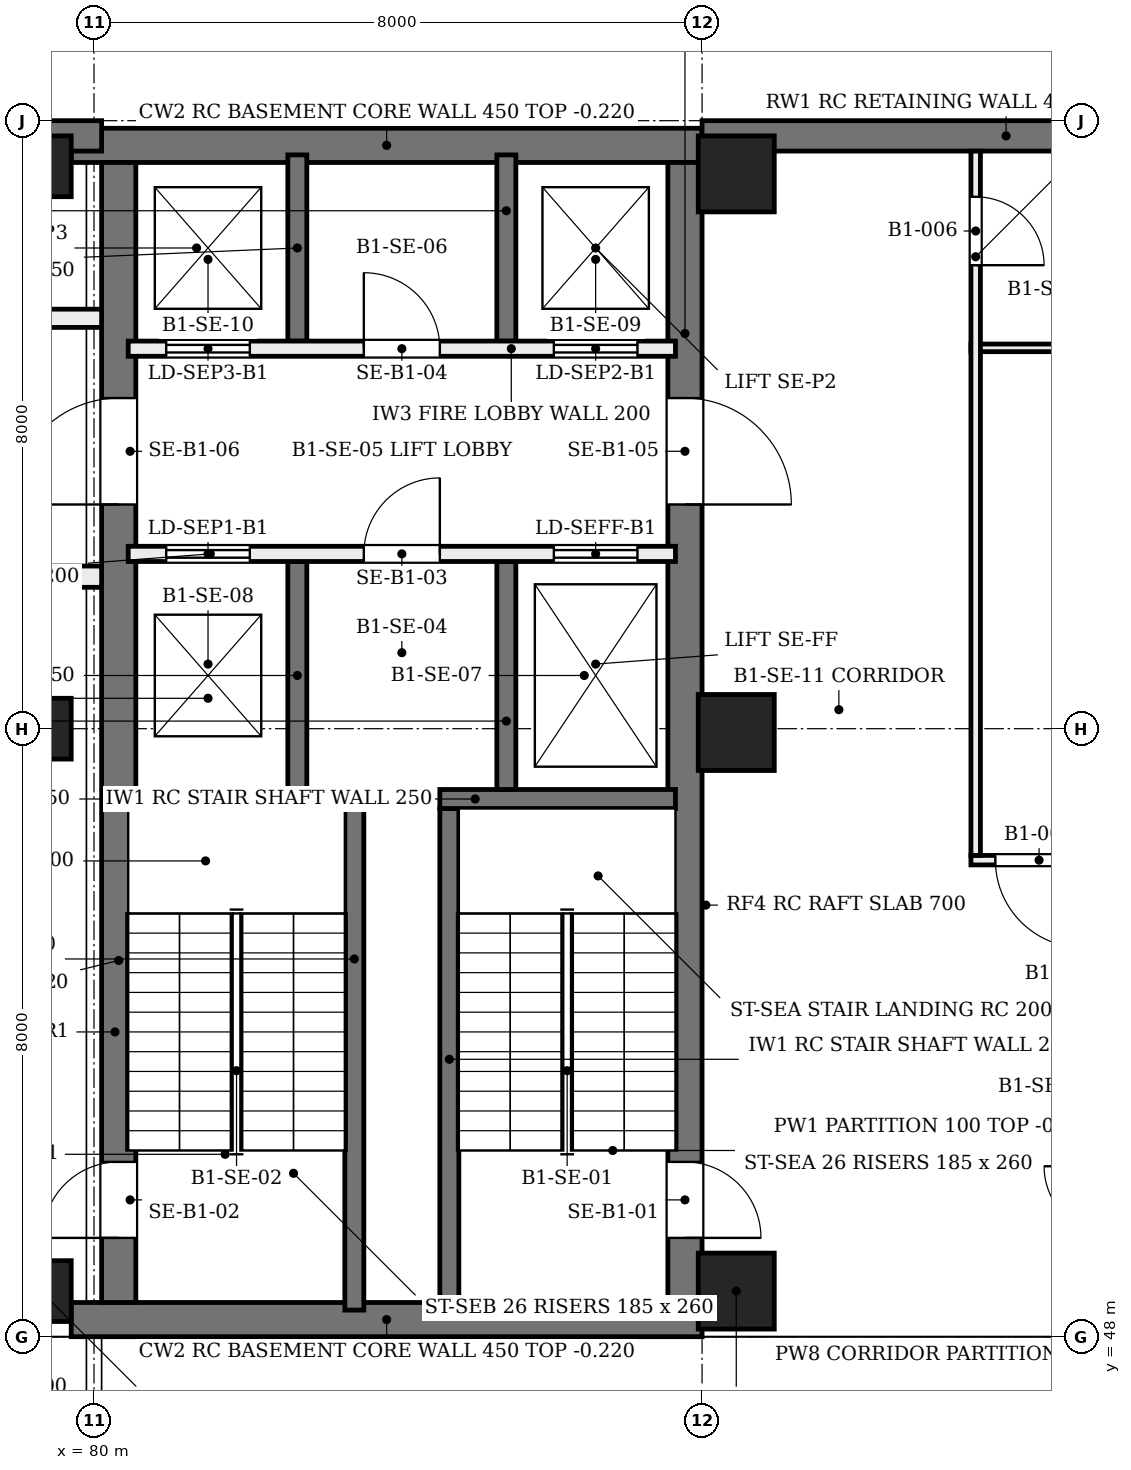
"""IFC4 building model, lengths in metres.
Left out: names, types, materials, properties, quantities, classifications, styles, units other than length and angle.
Written with IfcOpenShell. Run it as: python <this file> out.ifc"""

import sys

from ifc_helpers import new_model, si_unit, direction, frame, frame_2d, origin, origin_2d, place, context, subcontext, project, spatial, rectangle, extrude, element, fill, save


model = new_model("IFC4")
c1 = context("Model", 3, precision=1e-05, world=origin(), true_north=direction((0.0, 1.0)))
c2 = subcontext(c1, "Body", "Model", "MODEL_VIEW")
j1 = project(units=[si_unit("LENGTHUNIT", "METRE"), si_unit("PLANEANGLEUNIT", "RADIAN")], contexts=[c1])
p1 = place(None, origin())
s1 = spatial("IfcSite", under=j1, at=p1, CompositionType="ELEMENT")
p2 = place(p1, origin())
s2 = spatial("IfcBuilding", under=s1, at=p2, CompositionType="ELEMENT")
p3 = place(p2, frame((0.0, 0.0, -4.8)))
s3 = spatial("IfcBuildingStorey", under=s2, at=p3, CompositionType="ELEMENT", Elevation=-4.8)
for number, where, z_axis, x_axis in (
    (1, (79.7, 48.225, 0.0), (0.0, 0.0, 1.0), (1.0, 0.0, 0.0)),
    (2, (79.7, 63.675, 0.0), (0.0, 0.0, 1.0), (1.0, 0.0, 0.0)),
):
    element("IfcWall", number, at=place(p3, frame(where, z_axis=z_axis, x_axis=x_axis)), inside=s3, PredefinedType="SHEAR", context=c2, shape_type="SweptSolid", body=[
        extrude(rectangle(XDim=8.3, YDim=0.45, at=frame_2d((4.15, 0.0))), origin(), (0.0, 0.0, 1.0), 4.58),
    ])
p4 = place(p3, frame((80.325, 48.45, 0.0), z_axis=(0.0, 0.0, 1.0), x_axis=(0.0, 1.0, 0.0)))
e3 = element("IfcWall", 3, at=p4, inside=s3, PredefinedType="SHEAR", context=c2, shape_type="SweptSolid", body=[
    extrude(rectangle(XDim=15.0, YDim=0.45, at=frame_2d((7.5, 0.0))), origin(), (0.0, 0.0, 1.0), 4.58),
])
p5 = place(p4, frame((0.85, 0.0, 0.0)))
e4 = element("IfcOpeningElement", 4, at=p5, cuts=e3, PredefinedType="OPENING", context=c2, shape_type="SweptSolid", body=[
    extrude(rectangle(XDim=1.0, YDim=2.1, at=frame_2d((0.5, 1.05))), frame((0.0, 0.235, 0.0), z_axis=(0.0, -1.0, 0.0), x_axis=(1.0, 0.0, 0.0)), (0.0, 0.0, 1.0), 0.47),
])
p6 = place(p4, frame((10.5, 0.0, 0.0)))
e5 = element("IfcOpeningElement", 5, at=p6, cuts=e3, PredefinedType="OPENING", context=c2, shape_type="SweptSolid", body=[
    extrude(rectangle(XDim=1.4, YDim=2.1, at=frame_2d((0.7, 1.05))), frame((0.0, 0.235, 0.0), z_axis=(0.0, -1.0, 0.0), x_axis=(1.0, 0.0, 0.0)), (0.0, 0.0, 1.0), 0.47),
])
p7 = place(p3, frame((87.775, 48.45, 0.0), z_axis=(0.0, 0.0, 1.0), x_axis=(0.0, 1.0, 0.0)))
e6 = element("IfcWall", 6, at=p7, inside=s3, PredefinedType="SHEAR", context=c2, shape_type="SweptSolid", body=[
    extrude(rectangle(XDim=15.0, YDim=0.45, at=frame_2d((7.5, 0.0))), origin(), (0.0, 0.0, 1.0), 4.58),
])
p8 = place(p7, frame((0.85, 0.0, 0.0)))
e7 = element("IfcOpeningElement", 7, at=p8, cuts=e6, PredefinedType="OPENING", context=c2, shape_type="SweptSolid", body=[
    extrude(rectangle(XDim=1.0, YDim=2.1, at=frame_2d((0.5, 1.05))), frame((0.0, 0.235, 0.0), z_axis=(0.0, -1.0, 0.0), x_axis=(1.0, 0.0, 0.0)), (0.0, 0.0, 1.0), 0.47),
])
p9 = place(p7, frame((10.5, 0.0, 0.0)))
e8 = element("IfcOpeningElement", 8, at=p9, cuts=e6, PredefinedType="OPENING", context=c2, shape_type="SweptSolid", body=[
    extrude(rectangle(XDim=1.4, YDim=2.1, at=frame_2d((0.7, 1.05))), frame((0.0, 0.235, 0.0), z_axis=(0.0, -1.0, 0.0), x_axis=(1.0, 0.0, 0.0)), (0.0, 0.0, 1.0), 0.47),
])
for number, where, z_axis, x_axis in (
    (9, (88.45, 48.6, 0.0), (0.0, 0.0, 1.0), (1.0, 0.0, 0.0)),
    (10, (88.45, 55.95, 0.0), (0.0, 0.0, 1.0), (1.0, 0.0, 0.0)),
    (11, (88.45, 63.3, 0.0), (0.0, 0.0, 1.0), (1.0, 0.0, 0.0)),
):
    element("IfcColumn", number, at=place(p3, frame(where, z_axis=z_axis, x_axis=x_axis)), inside=s3, PredefinedType="COLUMN", context=c2, shape_type="SweptSolid", body=[
        extrude(rectangle(XDim=1.0, YDim=1.0, at=origin_2d()), origin(), (0.0, 0.0, 1.0), 4.8),
    ])
for number, where, z_axis, x_axis in (
    (12, (79.3, 48.6, 0.0), (0.0, 0.0, 1.0), (1.0, 0.0, 0.0)),
    (13, (79.3, 56.0, 0.0), (0.0, 0.0, 1.0), (1.0, 0.0, 0.0)),
    (14, (79.3, 63.4, 0.0), (0.0, 0.0, 1.0), (1.0, 0.0, 0.0)),
):
    element("IfcColumn", number, at=place(p3, frame(where, z_axis=z_axis, x_axis=x_axis)), inside=s3, PredefinedType="COLUMN", context=c2, shape_type="SweptSolid", body=[
        extrude(rectangle(XDim=0.8, YDim=0.8, at=origin_2d()), origin(), (0.0, 0.0, 1.0), 4.58),
    ])
p10 = place(p3, frame((23.9, 63.8, 0.0), z_axis=(0.0, 0.0, 1.0), x_axis=(1.0, 0.0, 0.0)))
e15 = element("IfcWall", 15, at=p10, inside=s3, PredefinedType="SOLIDWALL", context=c2, shape_type="SweptSolid", body=[
    extrude(rectangle(XDim=56.2, YDim=0.4, at=frame_2d((28.1, 0.0))), origin(), (0.0, 0.0, 1.0), 4.55),
])
p11 = place(p3, frame((88.0, 63.8, 0.0), z_axis=(0.0, 0.0, 1.0), x_axis=(1.0, 0.0, 0.0)))
e16 = element("IfcWall", 16, at=p11, inside=s3, PredefinedType="SOLIDWALL", context=c2, shape_type="SweptSolid", body=[
    extrude(rectangle(XDim=8.0, YDim=0.4, at=frame_2d((4.0, 0.0))), origin(), (0.0, 0.0, 1.0), 4.55),
])
for number, where, z_axis, x_axis in (
    (17, (84.675, 48.35, 0.0), (0.0, 0.0, 1.0), (0.0, 1.0, 0.0)),
    (18, (83.425, 48.35, 0.0), (0.0, 0.0, 1.0), (0.0, 1.0, 0.0)),
):
    element("IfcWall", number, at=place(p3, frame(where, z_axis=z_axis, x_axis=x_axis)), inside=s3, PredefinedType="SOLIDWALL", context=c2, shape_type="SweptSolid", body=[
        extrude(rectangle(XDim=6.6, YDim=0.25, at=frame_2d((3.3, 0.0))), origin(), (0.0, 0.0, 1.0), 4.55),
    ])
p12 = place(p3, frame((87.65, 55.075, 0.0), z_axis=(0.0, 0.0, 1.0), x_axis=(-1.0, 0.0, 0.0)))
e19 = element("IfcWall", 19, at=p12, inside=s3, PredefinedType="SOLIDWALL", context=c2, shape_type="SweptSolid", body=[
    extrude(rectangle(XDim=3.1, YDim=0.25, at=frame_2d((1.55, 0.0))), origin(), (0.0, 0.0, 1.0), 4.55),
])
p13 = place(p3, frame((83.55, 55.075, 0.0), z_axis=(0.0, 0.0, 1.0), x_axis=(-1.0, 0.0, 0.0)))
e20 = element("IfcWall", 20, at=p13, inside=s3, PredefinedType="SOLIDWALL", context=c2, shape_type="SweptSolid", body=[
    extrude(rectangle(XDim=3.1, YDim=0.25, at=frame_2d((1.55, 0.0))), origin(), (0.0, 0.0, 1.0), 4.55),
])
p14 = place(p3, frame((85.425, 55.2, 0.0), z_axis=(0.0, 0.0, 1.0), x_axis=(0.0, 1.0, 0.0)))
e21 = element("IfcWall", 21, at=p14, inside=s3, PredefinedType="SOLIDWALL", context=c2, shape_type="SweptSolid", body=[
    extrude(rectangle(XDim=3.0, YDim=0.25, at=frame_2d((1.5, 0.0))), origin(), (0.0, 0.0, 1.0), 4.55),
])
p15 = place(p3, frame((85.425, 61.1, 0.0), z_axis=(0.0, 0.0, 1.0), x_axis=(0.0, 1.0, 0.0)))
e22 = element("IfcWall", 22, at=p15, inside=s3, PredefinedType="SOLIDWALL", context=c2, shape_type="SweptSolid", body=[
    extrude(rectangle(XDim=2.45, YDim=0.25, at=frame_2d((1.225, 0.0))), origin(), (0.0, 0.0, 1.0), 4.55),
])
p16 = place(p3, frame((82.675, 55.2, 0.0), z_axis=(0.0, 0.0, 1.0), x_axis=(0.0, 1.0, 0.0)))
e23 = element("IfcWall", 23, at=p16, inside=s3, PredefinedType="SOLIDWALL", context=c2, shape_type="SweptSolid", body=[
    extrude(rectangle(XDim=3.0, YDim=0.25, at=frame_2d((1.5, 0.0))), origin(), (0.0, 0.0, 1.0), 4.55),
])
p17 = place(p3, frame((82.675, 61.1, 0.0), z_axis=(0.0, 0.0, 1.0), x_axis=(0.0, 1.0, 0.0)))
e24 = element("IfcWall", 24, at=p17, inside=s3, PredefinedType="SOLIDWALL", context=c2, shape_type="SweptSolid", body=[
    extrude(rectangle(XDim=2.45, YDim=0.25, at=frame_2d((1.225, 0.0))), origin(), (0.0, 0.0, 1.0), 4.55),
])
p18 = place(p3, frame((87.65, 58.3, 0.0), z_axis=(0.0, 0.0, 1.0), x_axis=(-1.0, 0.0, 0.0)))
e25 = element("IfcWall", 25, at=p18, inside=s3, PredefinedType="SOLIDWALL", context=c2, shape_type="SweptSolid", body=[
    extrude(rectangle(XDim=7.2, YDim=0.2, at=frame_2d((3.6, 0.0))), origin(), (0.0, 0.0, 1.0), 4.55),
])
p19 = place(p18, frame((0.5, 0.0, 0.0)))
e26 = element("IfcOpeningElement", 26, at=p19, cuts=e25, PredefinedType="OPENING", context=c2, shape_type="SweptSolid", body=[
    extrude(rectangle(XDim=1.1, YDim=2.1, at=frame_2d((0.55, 1.05))), frame((0.0, 0.11, 0.0), z_axis=(0.0, -1.0, 0.0), x_axis=(1.0, 0.0, 0.0)), (0.0, 0.0, 1.0), 0.22),
])
p20 = place(p18, frame((5.6, 0.0, 0.0)))
e27 = element("IfcOpeningElement", 27, at=p20, cuts=e25, PredefinedType="OPENING", context=c2, shape_type="SweptSolid", body=[
    extrude(rectangle(XDim=1.1, YDim=2.1, at=frame_2d((0.55, 1.05))), frame((0.0, 0.11, 0.0), z_axis=(0.0, -1.0, 0.0), x_axis=(1.0, 0.0, 0.0)), (0.0, 0.0, 1.0), 0.22),
])
p21 = place(p18, frame((3.1, 0.0, 0.0)))
e28 = element("IfcOpeningElement", 28, at=p21, cuts=e25, PredefinedType="OPENING", context=c2, shape_type="SweptSolid", body=[
    extrude(rectangle(XDim=1.0, YDim=2.1, at=frame_2d((0.5, 1.05))), frame((0.0, 0.11, 0.0), z_axis=(0.0, -1.0, 0.0), x_axis=(1.0, 0.0, 0.0)), (0.0, 0.0, 1.0), 0.22),
])
p22 = place(p3, frame((87.65, 61.0, 0.0), z_axis=(0.0, 0.0, 1.0), x_axis=(-1.0, 0.0, 0.0)))
e29 = element("IfcWall", 29, at=p22, inside=s3, PredefinedType="SOLIDWALL", context=c2, shape_type="SweptSolid", body=[
    extrude(rectangle(XDim=7.2, YDim=0.2, at=frame_2d((3.6, 0.0))), origin(), (0.0, 0.0, 1.0), 4.55),
])
p23 = place(p22, frame((0.5, 0.0, 0.0)))
e30 = element("IfcOpeningElement", 30, at=p23, cuts=e29, PredefinedType="OPENING", context=c2, shape_type="SweptSolid", body=[
    extrude(rectangle(XDim=1.1, YDim=2.1, at=frame_2d((0.55, 1.05))), frame((0.0, 0.11, 0.0), z_axis=(0.0, -1.0, 0.0), x_axis=(1.0, 0.0, 0.0)), (0.0, 0.0, 1.0), 0.22),
])
p24 = place(p22, frame((5.6, 0.0, 0.0)))
e31 = element("IfcOpeningElement", 31, at=p24, cuts=e29, PredefinedType="OPENING", context=c2, shape_type="SweptSolid", body=[
    extrude(rectangle(XDim=1.1, YDim=2.1, at=frame_2d((0.55, 1.05))), frame((0.0, 0.11, 0.0), z_axis=(0.0, -1.0, 0.0), x_axis=(1.0, 0.0, 0.0)), (0.0, 0.0, 1.0), 0.22),
])
p25 = place(p22, frame((3.1, 0.0, 0.0)))
e32 = element("IfcOpeningElement", 32, at=p25, cuts=e29, PredefinedType="OPENING", context=c2, shape_type="SweptSolid", body=[
    extrude(rectangle(XDim=1.0, YDim=2.1, at=frame_2d((0.5, 1.05))), frame((0.0, 0.11, 0.0), z_axis=(0.0, -1.0, 0.0), x_axis=(1.0, 0.0, 0.0)), (0.0, 0.0, 1.0), 0.22),
])
p26 = place(p3, frame((91.538, 54.27, 0.0), z_axis=(0.0, 0.0, 1.0), x_axis=(1.0, 0.0, 0.0)))
e33 = element("IfcWall", 33, at=p26, inside=s3, PredefinedType="PARTITIONING", context=c2, shape_type="SweptSolid", body=[
    extrude(rectangle(XDim=1.925, YDim=0.125, at=frame_2d((0.962, 0.0))), origin(), (0.0, 0.0, 1.0), 4.56),
])
p27 = place(p26, frame((0.322, 0.0, 0.0)))
e34 = element("IfcOpeningElement", 34, at=p27, cuts=e33, PredefinedType="OPENING", context=c2, shape_type="SweptSolid", body=[
    extrude(rectangle(XDim=1.15, YDim=2.1, at=frame_2d((0.575, 1.05))), frame((0.0, 0.073, 0.0), z_axis=(0.0, -1.0, 0.0), x_axis=(1.0, 0.0, 0.0)), (0.0, 0.0, 1.0), 0.145),
])
p28 = place(p3, frame((91.538, 61.011, 0.0), z_axis=(0.0, 0.0, 1.0), x_axis=(1.0, 0.0, 0.0)))
e35 = element("IfcWall", 35, at=p28, inside=s3, PredefinedType="PARTITIONING", context=c2, shape_type="SweptSolid", body=[
    extrude(rectangle(XDim=4.057, YDim=0.1, at=frame_2d((2.029, 0.0))), origin(), (0.0, 0.0, 1.0), 3.98),
])
p29 = place(p3, frame((91.6, 54.333, 0.0), z_axis=(0.0, 0.0, 1.0), x_axis=(0.0, 1.0, 0.0)))
e36 = element("IfcWall", 36, at=p29, inside=s3, PredefinedType="PARTITIONING", context=c2, shape_type="SweptSolid", body=[
    extrude(rectangle(XDim=9.267, YDim=0.125, at=frame_2d((4.634, 0.0))), origin(), (0.0, 0.0, 1.0), 3.98),
])
p30 = place(p29, frame((7.766, 0.0, 0.0)))
e37 = element("IfcOpeningElement", 37, at=p30, cuts=e36, PredefinedType="OPENING", context=c2, shape_type="SweptSolid", body=[
    extrude(rectangle(XDim=0.9, YDim=2.1, at=frame_2d((0.45, 1.05))), frame((0.0, 0.073, 0.0), z_axis=(0.0, -1.0, 0.0), x_axis=(1.0, 0.0, 0.0)), (0.0, 0.0, 1.0), 0.145),
])
p31 = place(p3, frame((64.355, 58.0, 0.0), z_axis=(0.0, 0.0, 1.0), x_axis=(1.0, 0.0, 0.0)))
e38 = element("IfcWall", 38, at=p31, inside=s3, PredefinedType="PARTITIONING", context=c2, shape_type="SweptSolid", body=[
    extrude(rectangle(XDim=15.745, YDim=0.28, at=frame_2d((7.873, 0.0))), origin(), (0.0, 0.0, 1.0), 3.88),
])
p32 = place(p31, frame((6.945, 0.0, 0.0)))
e39 = element("IfcOpeningElement", 39, at=p32, cuts=e38, PredefinedType="OPENING", context=c2, shape_type="SweptSolid", body=[
    extrude(rectangle(XDim=1.3, YDim=2.4, at=frame_2d((0.65, 1.2))), frame((0.0, 0.15, 0.0), z_axis=(0.0, -1.0, 0.0), x_axis=(1.0, 0.0, 0.0)), (0.0, 0.0, 1.0), 0.3),
])
p33 = place(p3, frame((64.355, 61.4, 0.0), z_axis=(0.0, 0.0, 1.0), x_axis=(1.0, 0.0, 0.0)))
e40 = element("IfcWall", 40, at=p33, inside=s3, PredefinedType="PARTITIONING", context=c2, shape_type="SweptSolid", body=[
    extrude(rectangle(XDim=15.745, YDim=0.24, at=frame_2d((7.873, 0.0))), origin(), (0.0, 0.0, 1.0), 3.88),
])
p34 = place(p33, frame((6.733, 0.0, 0.0)))
e41 = element("IfcOpeningElement", 41, at=p34, cuts=e40, PredefinedType="OPENING", context=c2, shape_type="SweptSolid", body=[
    extrude(rectangle(XDim=1.4, YDim=2.4, at=frame_2d((0.7, 1.2))), frame((0.0, 0.13, 0.0), z_axis=(0.0, -1.0, 0.0), x_axis=(1.0, 0.0, 0.0)), (0.0, 0.0, 1.0), 0.26),
])
p35 = place(p8, frame((1.0, 0.0, 0.0), z_axis=(0.0, 0.0, 1.0), x_axis=(-1.0, 0.0, 0.0)))
e42 = element("IfcDoor", 42, at=p35, inside=s3, OperationType="SINGLE_SWING_LEFT", PredefinedType="DOOR", context=c2, shape_type="SweptSolid", body=[
    extrude(rectangle(XDim=1.0, YDim=2.1, at=frame_2d((0.5, 1.05))), frame((0.0, 0.025, 0.0), z_axis=(0.0, -1.0, 0.0), x_axis=(1.0, 0.0, 0.0)), (0.0, 0.0, 1.0), 0.05),
])
fill(e7, e42)
p36 = place(p5, origin())
e43 = element("IfcDoor", 43, at=p36, inside=s3, OperationType="SINGLE_SWING_LEFT", PredefinedType="DOOR", context=c2, shape_type="SweptSolid", body=[
    extrude(rectangle(XDim=1.0, YDim=2.1, at=frame_2d((0.5, 1.05))), frame((0.0, 0.025, 0.0), z_axis=(0.0, -1.0, 0.0), x_axis=(1.0, 0.0, 0.0)), (0.0, 0.0, 1.0), 0.05),
])
fill(e4, e43)
p37 = place(p19, frame((1.1, 0.0, 0.0), z_axis=(0.0, 0.0, 1.0), x_axis=(-1.0, 0.0, 0.0)))
e44 = element("IfcDoor", 44, at=p37, inside=s3, OperationType="DOUBLE_DOOR_SLIDING", PredefinedType="DOOR", context=c2, shape_type="SweptSolid", body=[
    extrude(rectangle(XDim=1.1, YDim=2.1, at=frame_2d((0.55, 1.05))), frame((0.0, 0.025, 0.0), z_axis=(0.0, -1.0, 0.0), x_axis=(1.0, 0.0, 0.0)), (0.0, 0.0, 1.0), 0.05),
])
fill(e26, e44)
p38 = place(p20, frame((1.1, 0.0, 0.0), z_axis=(0.0, 0.0, 1.0), x_axis=(-1.0, 0.0, 0.0)))
e45 = element("IfcDoor", 45, at=p38, inside=s3, OperationType="DOUBLE_DOOR_SLIDING", PredefinedType="DOOR", context=c2, shape_type="SweptSolid", body=[
    extrude(rectangle(XDim=1.1, YDim=2.1, at=frame_2d((0.55, 1.05))), frame((0.0, 0.025, 0.0), z_axis=(0.0, -1.0, 0.0), x_axis=(1.0, 0.0, 0.0)), (0.0, 0.0, 1.0), 0.05),
])
fill(e27, e45)
p39 = place(p23, origin())
e46 = element("IfcDoor", 46, at=p39, inside=s3, OperationType="DOUBLE_DOOR_SLIDING", PredefinedType="DOOR", context=c2, shape_type="SweptSolid", body=[
    extrude(rectangle(XDim=1.1, YDim=2.1, at=frame_2d((0.55, 1.05))), frame((0.0, 0.025, 0.0), z_axis=(0.0, -1.0, 0.0), x_axis=(1.0, 0.0, 0.0)), (0.0, 0.0, 1.0), 0.05),
])
fill(e30, e46)
p40 = place(p24, origin())
e47 = element("IfcDoor", 47, at=p40, inside=s3, OperationType="DOUBLE_DOOR_SLIDING", PredefinedType="DOOR", context=c2, shape_type="SweptSolid", body=[
    extrude(rectangle(XDim=1.1, YDim=2.1, at=frame_2d((0.55, 1.05))), frame((0.0, 0.025, 0.0), z_axis=(0.0, -1.0, 0.0), x_axis=(1.0, 0.0, 0.0)), (0.0, 0.0, 1.0), 0.05),
])
fill(e31, e47)
p41 = place(p21, frame((1.0, 0.0, 0.0), z_axis=(0.0, 0.0, 1.0), x_axis=(-1.0, 0.0, 0.0)))
e48 = element("IfcDoor", 48, at=p41, inside=s3, OperationType="SINGLE_SWING_LEFT", PredefinedType="DOOR", context=c2, shape_type="SweptSolid", body=[
    extrude(rectangle(XDim=1.0, YDim=2.1, at=frame_2d((0.5, 1.05))), frame((0.0, 0.025, 0.0), z_axis=(0.0, -1.0, 0.0), x_axis=(1.0, 0.0, 0.0)), (0.0, 0.0, 1.0), 0.05),
])
fill(e28, e48)
p42 = place(p25, origin())
e49 = element("IfcDoor", 49, at=p42, inside=s3, OperationType="SINGLE_SWING_RIGHT", PredefinedType="DOOR", context=c2, shape_type="SweptSolid", body=[
    extrude(rectangle(XDim=1.0, YDim=2.1, at=frame_2d((0.5, 1.05))), frame((0.0, 0.025, 0.0), z_axis=(0.0, -1.0, 0.0), x_axis=(1.0, 0.0, 0.0)), (0.0, 0.0, 1.0), 0.05),
])
fill(e32, e49)
p43 = place(p9, frame((1.4, 0.0, 0.0), z_axis=(0.0, 0.0, 1.0), x_axis=(-1.0, 0.0, 0.0)))
e50 = element("IfcDoor", 50, at=p43, inside=s3, OperationType="SINGLE_SWING_LEFT", PredefinedType="DOOR", context=c2, shape_type="SweptSolid", body=[
    extrude(rectangle(XDim=1.4, YDim=2.1, at=frame_2d((0.7, 1.05))), frame((0.0, 0.025, 0.0), z_axis=(0.0, -1.0, 0.0), x_axis=(1.0, 0.0, 0.0)), (0.0, 0.0, 1.0), 0.05),
])
fill(e8, e50)
p44 = place(p6, origin())
e51 = element("IfcDoor", 51, at=p44, inside=s3, OperationType="SINGLE_SWING_LEFT", PredefinedType="DOOR", context=c2, shape_type="SweptSolid", body=[
    extrude(rectangle(XDim=1.4, YDim=2.1, at=frame_2d((0.7, 1.05))), frame((0.0, 0.025, 0.0), z_axis=(0.0, -1.0, 0.0), x_axis=(1.0, 0.0, 0.0)), (0.0, 0.0, 1.0), 0.05),
])
fill(e5, e51)
p45 = place(p27, origin())
e52 = element("IfcDoor", 52, at=p45, inside=s3, OperationType="SINGLE_SWING_RIGHT", PredefinedType="DOOR", context=c2, shape_type="SweptSolid", body=[
    extrude(rectangle(XDim=1.15, YDim=2.1, at=frame_2d((0.575, 1.05))), frame((0.0, 0.025, 0.0), z_axis=(0.0, -1.0, 0.0), x_axis=(1.0, 0.0, 0.0)), (0.0, 0.0, 1.0), 0.05),
])
fill(e34, e52)
p46 = place(p30, frame((0.9, 0.0, 0.0), z_axis=(0.0, 0.0, 1.0), x_axis=(-1.0, 0.0, 0.0)))
e53 = element("IfcDoor", 53, at=p46, inside=s3, OperationType="SINGLE_SWING_LEFT", PredefinedType="DOOR", context=c2, shape_type="SweptSolid", body=[
    extrude(rectangle(XDim=0.9, YDim=2.1, at=frame_2d((0.45, 1.05))), frame((0.0, 0.025, 0.0), z_axis=(0.0, -1.0, 0.0), x_axis=(1.0, 0.0, 0.0)), (0.0, 0.0, 1.0), 0.05),
])
fill(e37, e53)
save(model, sys.argv[1])
